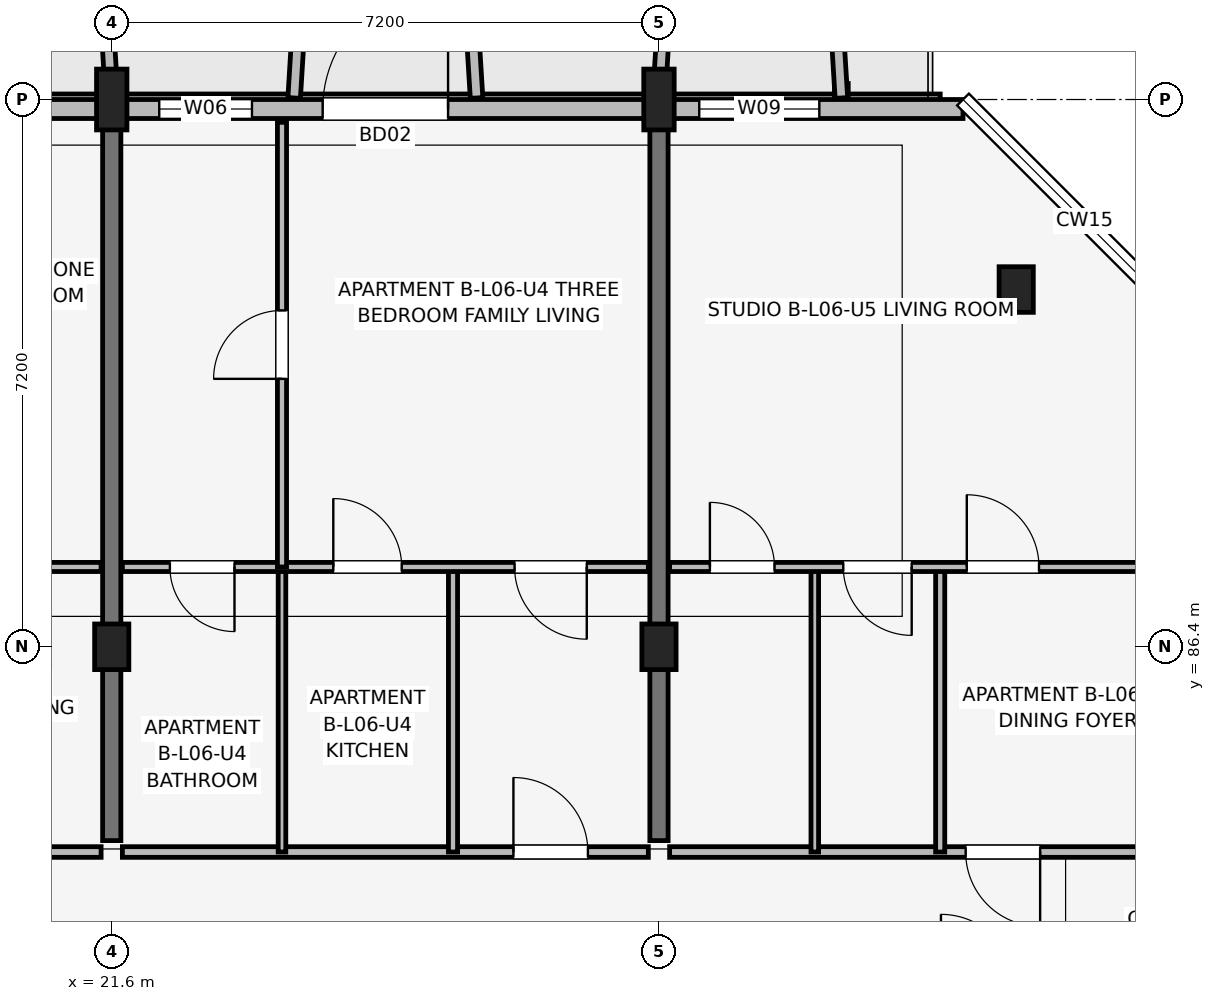
"""IFC4 building model, lengths in metres.
Left out: names, types, materials, properties, quantities, classifications, styles, units other than length and angle.
Written with IfcOpenShell. Run it as: python <this file> out.ifc"""

import sys

from ifc_helpers import new_model, si_unit, direction, frame, frame_2d, origin, origin_2d, place, context, subcontext, project, spatial, rectangle, extrude, element, fill, save


model = new_model("IFC4")
c1 = context("Model", 3, precision=1e-05, world=origin(), true_north=direction((0.0, 1.0)))
c2 = subcontext(c1, "Body", "Model", "MODEL_VIEW")
j1 = project(units=[si_unit("LENGTHUNIT", "METRE"), si_unit("PLANEANGLEUNIT", "RADIAN")], contexts=[c1])
p1 = place(None, origin())
s1 = spatial("IfcSite", under=j1, at=p1, CompositionType="ELEMENT")
p2 = place(p1, origin())
s2 = spatial("IfcBuilding", under=s1, at=p2, CompositionType="ELEMENT")
p3 = place(p2, frame((0.0, 0.0, 21.3)))
s3 = spatial("IfcBuildingStorey", under=s2, at=p3, CompositionType="ELEMENT", Elevation=21.3)
p4 = place(p3, frame((21.6, 86.4, 0.0), z_axis=(0.0, 0.0, 1.0), x_axis=(1.0, 0.0, 0.0)))
e1 = element("IfcColumn", 1, at=p4, inside=s3, PredefinedType="COLUMN", context=c2, shape_type="SweptSolid", body=[
    extrude(rectangle(XDim=0.45, YDim=0.6, at=origin_2d()), origin(), (0.0, 0.0, 1.0), 3.15),
])
p5 = place(p3, frame((21.6, 93.6, 0.0), z_axis=(0.0, 0.0, 1.0), x_axis=(1.0, 0.0, 0.0)))
e2 = element("IfcColumn", 2, at=p5, inside=s3, PredefinedType="COLUMN", context=c2, shape_type="SweptSolid", body=[
    extrude(rectangle(XDim=0.4, YDim=0.8, at=origin_2d()), origin(), (0.0, 0.0, 1.0), 3.15),
])
p6 = place(p3, frame((28.8, 86.4, 0.0), z_axis=(0.0, 0.0, 1.0), x_axis=(1.0, 0.0, 0.0)))
e3 = element("IfcColumn", 3, at=p6, inside=s3, PredefinedType="COLUMN", context=c2, shape_type="SweptSolid", body=[
    extrude(rectangle(XDim=0.45, YDim=0.6, at=origin_2d()), origin(), (0.0, 0.0, 1.0), 3.15),
])
p7 = place(p3, frame((28.8, 93.6, 0.0), z_axis=(0.0, 0.0, 1.0), x_axis=(1.0, 0.0, 0.0)))
e4 = element("IfcColumn", 4, at=p7, inside=s3, PredefinedType="COLUMN", context=c2, shape_type="SweptSolid", body=[
    extrude(rectangle(XDim=0.4, YDim=0.8, at=origin_2d()), origin(), (0.0, 0.0, 1.0), 3.15),
])
p8 = place(p3, frame((33.5, 91.1, 0.0), z_axis=(0.0, 0.0, 1.0), x_axis=(1.0, 0.0, 0.0)))
e5 = element("IfcColumn", 5, at=p8, inside=s3, PredefinedType="COLUMN", context=c2, shape_type="SweptSolid", body=[
    extrude(rectangle(XDim=0.45, YDim=0.6, at=origin_2d()), origin(), (0.0, 0.0, 1.0), 3.15),
])
for number, where, z_axis, x_axis in (
    (6, (21.6, 83.85, 0.0), (0.0, 0.0, 1.0), (0.0, 1.0, 0.0)),
    (7, (28.8, 83.85, 0.0), (0.0, 0.0, 1.0), (0.0, 1.0, 0.0)),
):
    element("IfcWall", number, at=place(p3, frame(where, z_axis=z_axis, x_axis=x_axis)), inside=s3, PredefinedType="SHEAR", context=c2, shape_type="SweptSolid", body=[
        extrude(rectangle(XDim=9.4, YDim=0.24, at=frame_2d((4.7, 0.0))), origin(), (0.0, 0.0, 1.0), 3.15),
    ])
p9 = place(p3, frame((32.8, 93.475, 0.0), z_axis=(0.0, 0.0, 1.0), x_axis=(-1.0, 0.0, 0.0)))
e8 = element("IfcWall", 8, at=p9, inside=s3, PredefinedType="SOLIDWALL", context=c2, shape_type="SweptSolid", body=[
    extrude(rectangle(XDim=29.6, YDim=0.25, at=frame_2d((14.8, 0.0))), origin(), (0.0, 0.0, 1.0), 2.43),
])
p10 = place(p9, frame((22.9, 0.0, 0.0), z_axis=(0.0, 0.0, 1.0), x_axis=(-1.0, 0.0, 0.0)))
e9 = element("IfcOpeningElement", 9, at=p10, cuts=e8, PredefinedType="OPENING", context=c2, shape_type="SweptSolid", body=[
    extrude(rectangle(XDim=1.8, YDim=2.15, at=frame_2d((0.9, 1.075))), frame((0.0, 0.135, 0.0), z_axis=(0.0, -1.0, 0.0), x_axis=(1.0, 0.0, 0.0)), (0.0, 0.0, 1.0), 0.27),
])
p11 = place(p9, frame((8.425, 0.0, 0.0), z_axis=(0.0, 0.0, 1.0), x_axis=(-1.0, 0.0, 0.0)))
e10 = element("IfcOpeningElement", 10, at=p11, cuts=e8, PredefinedType="OPENING", context=c2, shape_type="SweptSolid", body=[
    extrude(rectangle(XDim=1.65, YDim=2.15, at=frame_2d((0.825, 1.075))), frame((0.0, 0.135, 0.0), z_axis=(0.0, -1.0, 0.0), x_axis=(1.0, 0.0, 0.0)), (0.0, 0.0, 1.0), 0.27),
])
p12 = place(p9, frame((26.25, 0.0, 0.75)))
e11 = element("IfcOpeningElement", 11, at=p12, cuts=e8, PredefinedType="OPENING", context=c2, shape_type="SweptSolid", body=[
    extrude(rectangle(XDim=0.72, YDim=1.35, at=frame_2d((0.36, 0.675))), frame((0.0, 0.135, 0.0), z_axis=(0.0, -1.0, 0.0), x_axis=(1.0, 0.0, 0.0)), (0.0, 0.0, 1.0), 0.27),
])
p13 = place(p9, frame((24.065, 0.0, 0.75)))
e12 = element("IfcOpeningElement", 12, at=p13, cuts=e8, PredefinedType="OPENING", context=c2, shape_type="SweptSolid", body=[
    extrude(rectangle(XDim=0.85, YDim=1.4, at=frame_2d((0.425, 0.7))), frame((0.0, 0.135, 0.0), z_axis=(0.0, -1.0, 0.0), x_axis=(1.0, 0.0, 0.0)), (0.0, 0.0, 1.0), 0.27),
])
p14 = place(p9, frame((16.675, 0.0, 0.75)))
e13 = element("IfcOpeningElement", 13, at=p14, cuts=e8, PredefinedType="OPENING", context=c2, shape_type="SweptSolid", body=[
    extrude(rectangle(XDim=0.98, YDim=1.45, at=frame_2d((0.49, 0.725))), frame((0.0, 0.135, 0.0), z_axis=(0.0, -1.0, 0.0), x_axis=(1.0, 0.0, 0.0)), (0.0, 0.0, 1.0), 0.27),
])
p15 = place(p9, frame((13.725, 0.0, 0.67)))
e14 = element("IfcOpeningElement", 14, at=p15, cuts=e8, PredefinedType="OPENING", context=c2, shape_type="SweptSolid", body=[
    extrude(rectangle(XDim=2.15, YDim=1.65, at=frame_2d((1.075, 0.825))), frame((0.0, 0.135, 0.0), z_axis=(0.0, -1.0, 0.0), x_axis=(1.0, 0.0, 0.0)), (0.0, 0.0, 1.0), 0.27),
])
p16 = place(p9, frame((9.355, 0.0, 0.75)))
e15 = element("IfcOpeningElement", 15, at=p16, cuts=e8, PredefinedType="OPENING", context=c2, shape_type="SweptSolid", body=[
    extrude(rectangle(XDim=1.22, YDim=1.5, at=frame_2d((0.61, 0.75))), frame((0.0, 0.135, 0.0), z_axis=(0.0, -1.0, 0.0), x_axis=(1.0, 0.0, 0.0)), (0.0, 0.0, 1.0), 0.27),
])
p17 = place(p9, frame((1.89, 0.0, 0.7)))
e16 = element("IfcOpeningElement", 16, at=p17, cuts=e8, PredefinedType="OPENING", context=c2, shape_type="SweptSolid", body=[
    extrude(rectangle(XDim=1.58, YDim=1.6, at=frame_2d((0.79, 0.8))), frame((0.0, 0.135, 0.0), z_axis=(0.0, -1.0, 0.0), x_axis=(1.0, 0.0, 0.0)), (0.0, 0.0, 1.0), 0.27),
])
p18 = place(p3, frame((21.6, 93.62, 0.0), z_axis=(0.0, 0.0, 1.0), x_axis=(-0.061170732449, 0.998127317276, 0.0)))
e17 = element("IfcWall", 17, at=p18, inside=s3, PredefinedType="ELEMENTEDWALL", context=c2, shape_type="SweptSolid", body=[
    extrude(rectangle(XDim=1.964, YDim=0.165, at=frame_2d((0.982, 0.0))), origin(), (0.0, 0.0, 1.0), 2.53),
])
for number, where, z_axis, x_axis in (
    (18, (24.0, 93.62, 0.0), (0.0, 0.0, 1.0), (0.061, 0.998, 0.0)),
    (19, (26.4, 93.62, 0.0), (0.0, 0.0, 1.0), (-0.061, 0.998, 0.0)),
):
    element("IfcWall", number, at=place(p3, frame(where, z_axis=z_axis, x_axis=x_axis)), inside=s3, PredefinedType="ELEMENTEDWALL", context=c2, shape_type="SweptSolid", body=[
        extrude(rectangle(XDim=1.964, YDim=0.165, at=frame_2d((0.982, 0.0))), origin(), (0.0, 0.0, 1.0), 2.55),
    ])
for number, where, z_axis, x_axis in (
    (20, (28.8, 93.62, 0.0), (0.0, 0.0, 1.0), (0.061, 0.998, 0.0)),
    (21, (31.2, 93.62, 0.0), (0.0, 0.0, 1.0), (-0.061, 0.998, 0.0)),
):
    element("IfcWall", number, at=place(p3, frame(where, z_axis=z_axis, x_axis=x_axis)), inside=s3, PredefinedType="ELEMENTEDWALL", context=c2, shape_type="SweptSolid", body=[
        extrude(rectangle(XDim=1.964, YDim=0.165, at=frame_2d((0.982, 0.0))), origin(), (0.0, 0.0, 1.0), 2.95),
    ])
p19 = place(p3, frame((14.54, 83.7, 0.0), z_axis=(0.0, 0.0, 1.0), x_axis=(1.0, 0.0, 0.0)))
e22 = element("IfcWall", 22, at=p19, inside=s3, PredefinedType="PARTITIONING", context=c2, shape_type="SweptSolid", body=[
    extrude(rectangle(XDim=6.92, YDim=0.14, at=frame_2d((3.46, 0.0))), origin(), (0.0, 0.0, 1.0), 2.38),
])
p20 = place(p19, frame((5.975, 0.0, 0.0), z_axis=(0.0, 0.0, 1.0), x_axis=(-1.0, 0.0, 0.0)))
e23 = element("IfcOpeningElement", 23, at=p20, cuts=e22, PredefinedType="OPENING", context=c2, shape_type="SweptSolid", body=[
    extrude(rectangle(XDim=0.98, YDim=2.1, at=frame_2d((0.49, 1.05))), frame((0.0, 0.08, 0.0), z_axis=(0.0, -1.0, 0.0), x_axis=(1.0, 0.0, 0.0)), (0.0, 0.0, 1.0), 0.16),
])
p21 = place(p3, frame((14.54, 87.45, 0.0), z_axis=(0.0, 0.0, 1.0), x_axis=(1.0, 0.0, 0.0)))
e24 = element("IfcWall", 24, at=p21, inside=s3, PredefinedType="PARTITIONING", context=c2, shape_type="SweptSolid", body=[
    extrude(rectangle(XDim=6.92, YDim=0.12, at=frame_2d((3.46, 0.0))), origin(), (0.0, 0.0, 1.0), 2.38),
])
p22 = place(p21, frame((0.625, 0.0, 0.0)))
e25 = element("IfcOpeningElement", 25, at=p22, cuts=e24, PredefinedType="OPENING", context=c2, shape_type="SweptSolid", body=[
    extrude(rectangle(XDim=0.85, YDim=2.08, at=frame_2d((0.425, 1.04))), frame((0.0, 0.07, 0.0), z_axis=(0.0, -1.0, 0.0), x_axis=(1.0, 0.0, 0.0)), (0.0, 0.0, 1.0), 0.14),
])
p23 = place(p21, frame((3.525, 0.0, 0.0), z_axis=(0.0, 0.0, 1.0), x_axis=(-1.0, 0.0, 0.0)))
e26 = element("IfcOpeningElement", 26, at=p23, cuts=e24, PredefinedType="OPENING", context=c2, shape_type="SweptSolid", body=[
    extrude(rectangle(XDim=0.9, YDim=2.08, at=frame_2d((0.45, 1.04))), frame((0.0, 0.07, 0.0), z_axis=(0.0, -1.0, 0.0), x_axis=(1.0, 0.0, 0.0)), (0.0, 0.0, 1.0), 0.14),
])
p24 = place(p21, frame((5.01, 0.0, 0.0)))
e27 = element("IfcOpeningElement", 27, at=p24, cuts=e24, PredefinedType="OPENING", context=c2, shape_type="SweptSolid", body=[
    extrude(rectangle(XDim=0.95, YDim=2.08, at=frame_2d((0.475, 1.04))), frame((0.0, 0.07, 0.0), z_axis=(0.0, -1.0, 0.0), x_axis=(1.0, 0.0, 0.0)), (0.0, 0.0, 1.0), 0.14),
])
p25 = place(p3, frame((21.74, 83.7, 0.0), z_axis=(0.0, 0.0, 1.0), x_axis=(1.0, 0.0, 0.0)))
e28 = element("IfcWall", 28, at=p25, inside=s3, PredefinedType="PARTITIONING", context=c2, shape_type="SweptSolid", body=[
    extrude(rectangle(XDim=6.92, YDim=0.14, at=frame_2d((3.46, 0.0))), origin(), (0.0, 0.0, 1.0), 2.38),
])
p26 = place(p25, frame((5.145, 0.0, 0.0)))
e29 = element("IfcOpeningElement", 29, at=p26, cuts=e28, PredefinedType="OPENING", context=c2, shape_type="SweptSolid", body=[
    extrude(rectangle(XDim=0.98, YDim=2.1, at=frame_2d((0.49, 1.05))), frame((0.0, 0.08, 0.0), z_axis=(0.0, -1.0, 0.0), x_axis=(1.0, 0.0, 0.0)), (0.0, 0.0, 1.0), 0.16),
])
p27 = place(p3, frame((23.84, 83.7, 0.0), z_axis=(0.0, 0.0, 1.0), x_axis=(0.0, 1.0, 0.0)))
e30 = element("IfcWall", 30, at=p27, inside=s3, PredefinedType="PARTITIONING", context=c2, shape_type="SweptSolid", body=[
    extrude(rectangle(XDim=3.75, YDim=0.1, at=frame_2d((1.875, 0.0))), origin(), (0.0, 0.0, 1.0), 2.38),
])
p28 = place(p3, frame((26.09, 83.7, 0.0), z_axis=(0.0, 0.0, 1.0), x_axis=(0.0, 1.0, 0.0)))
e31 = element("IfcWall", 31, at=p28, inside=s3, PredefinedType="PARTITIONING", context=c2, shape_type="SweptSolid", body=[
    extrude(rectangle(XDim=3.75, YDim=0.12, at=frame_2d((1.875, 0.0))), origin(), (0.0, 0.0, 1.0), 2.38),
])
p29 = place(p3, frame((21.74, 87.45, 0.0), z_axis=(0.0, 0.0, 1.0), x_axis=(1.0, 0.0, 0.0)))
e32 = element("IfcWall", 32, at=p29, inside=s3, PredefinedType="PARTITIONING", context=c2, shape_type="SweptSolid", body=[
    extrude(rectangle(XDim=6.92, YDim=0.12, at=frame_2d((3.46, 0.0))), origin(), (0.0, 0.0, 1.0), 2.38),
])
p30 = place(p29, frame((1.475, 0.0, 0.0), z_axis=(0.0, 0.0, 1.0), x_axis=(-1.0, 0.0, 0.0)))
e33 = element("IfcOpeningElement", 33, at=p30, cuts=e32, PredefinedType="OPENING", context=c2, shape_type="SweptSolid", body=[
    extrude(rectangle(XDim=0.85, YDim=2.08, at=frame_2d((0.425, 1.04))), frame((0.0, 0.07, 0.0), z_axis=(0.0, -1.0, 0.0), x_axis=(1.0, 0.0, 0.0)), (0.0, 0.0, 1.0), 0.14),
])
p31 = place(p29, frame((2.775, 0.0, 0.0)))
e34 = element("IfcOpeningElement", 34, at=p31, cuts=e32, PredefinedType="OPENING", context=c2, shape_type="SweptSolid", body=[
    extrude(rectangle(XDim=0.9, YDim=2.08, at=frame_2d((0.45, 1.04))), frame((0.0, 0.07, 0.0), z_axis=(0.0, -1.0, 0.0), x_axis=(1.0, 0.0, 0.0)), (0.0, 0.0, 1.0), 0.14),
])
p32 = place(p29, frame((6.11, 0.0, 0.0), z_axis=(0.0, 0.0, 1.0), x_axis=(-1.0, 0.0, 0.0)))
e35 = element("IfcOpeningElement", 35, at=p32, cuts=e32, PredefinedType="OPENING", context=c2, shape_type="SweptSolid", body=[
    extrude(rectangle(XDim=0.95, YDim=2.08, at=frame_2d((0.475, 1.04))), frame((0.0, 0.07, 0.0), z_axis=(0.0, -1.0, 0.0), x_axis=(1.0, 0.0, 0.0)), (0.0, 0.0, 1.0), 0.14),
])
p33 = place(p3, frame((23.84, 87.45, 0.0), z_axis=(0.0, 0.0, 1.0), x_axis=(0.0, 1.0, 0.0)))
e36 = element("IfcWall", 36, at=p33, inside=s3, PredefinedType="PARTITIONING", context=c2, shape_type="SweptSolid", body=[
    extrude(rectangle(XDim=5.85, YDim=0.12, at=frame_2d((2.925, 0.0))), origin(), (0.0, 0.0, 1.0), 2.38),
])
p34 = place(p33, frame((2.475, 0.0, 0.0)))
e37 = element("IfcOpeningElement", 37, at=p34, cuts=e36, PredefinedType="OPENING", context=c2, shape_type="SweptSolid", body=[
    extrude(rectangle(XDim=0.9, YDim=2.08, at=frame_2d((0.45, 1.04))), frame((0.0, 0.07, 0.0), z_axis=(0.0, -1.0, 0.0), x_axis=(1.0, 0.0, 0.0)), (0.0, 0.0, 1.0), 0.14),
])
p35 = place(p3, frame((28.94, 83.7, 0.0), z_axis=(0.0, 0.0, 1.0), x_axis=(1.0, 0.0, 0.0)))
e38 = element("IfcWall", 38, at=p35, inside=s3, PredefinedType="PARTITIONING", context=c2, shape_type="SweptSolid", body=[
    extrude(rectangle(XDim=6.92, YDim=0.14, at=frame_2d((3.46, 0.0))), origin(), (0.0, 0.0, 1.0), 2.38),
])
p36 = place(p35, frame((4.875, 0.0, 0.0), z_axis=(0.0, 0.0, 1.0), x_axis=(-1.0, 0.0, 0.0)))
e39 = element("IfcOpeningElement", 39, at=p36, cuts=e38, PredefinedType="OPENING", context=c2, shape_type="SweptSolid", body=[
    extrude(rectangle(XDim=0.98, YDim=2.1, at=frame_2d((0.49, 1.05))), frame((0.0, 0.08, 0.0), z_axis=(0.0, -1.0, 0.0), x_axis=(1.0, 0.0, 0.0)), (0.0, 0.0, 1.0), 0.16),
])
p37 = place(p3, frame((30.85, 83.7, 0.0), z_axis=(0.0, 0.0, 1.0), x_axis=(0.0, 1.0, 0.0)))
e40 = element("IfcWall", 40, at=p37, inside=s3, PredefinedType="PARTITIONING", context=c2, shape_type="SweptSolid", body=[
    extrude(rectangle(XDim=3.75, YDim=0.1, at=frame_2d((1.875, 0.0))), origin(), (0.0, 0.0, 1.0), 2.38),
])
p38 = place(p3, frame((32.5, 83.7, 0.0), z_axis=(0.0, 0.0, 1.0), x_axis=(0.0, 1.0, 0.0)))
e41 = element("IfcWall", 41, at=p38, inside=s3, PredefinedType="PARTITIONING", context=c2, shape_type="SweptSolid", body=[
    extrude(rectangle(XDim=3.75, YDim=0.12, at=frame_2d((1.875, 0.0))), origin(), (0.0, 0.0, 1.0), 2.38),
])
p39 = place(p3, frame((28.94, 87.45, 0.0), z_axis=(0.0, 0.0, 1.0), x_axis=(1.0, 0.0, 0.0)))
e42 = element("IfcWall", 42, at=p39, inside=s3, PredefinedType="PARTITIONING", context=c2, shape_type="SweptSolid", body=[
    extrude(rectangle(XDim=6.92, YDim=0.12, at=frame_2d((3.46, 0.0))), origin(), (0.0, 0.0, 1.0), 2.38),
])
p40 = place(p39, frame((0.53, 0.0, 0.0)))
e43 = element("IfcOpeningElement", 43, at=p40, cuts=e42, PredefinedType="OPENING", context=c2, shape_type="SweptSolid", body=[
    extrude(rectangle(XDim=0.85, YDim=2.08, at=frame_2d((0.425, 1.04))), frame((0.0, 0.07, 0.0), z_axis=(0.0, -1.0, 0.0), x_axis=(1.0, 0.0, 0.0)), (0.0, 0.0, 1.0), 0.14),
])
p41 = place(p39, frame((3.185, 0.0, 0.0), z_axis=(0.0, 0.0, 1.0), x_axis=(-1.0, 0.0, 0.0)))
e44 = element("IfcOpeningElement", 44, at=p41, cuts=e42, PredefinedType="OPENING", context=c2, shape_type="SweptSolid", body=[
    extrude(rectangle(XDim=0.9, YDim=2.08, at=frame_2d((0.45, 1.04))), frame((0.0, 0.07, 0.0), z_axis=(0.0, -1.0, 0.0), x_axis=(1.0, 0.0, 0.0)), (0.0, 0.0, 1.0), 0.14),
])
p42 = place(p39, frame((3.91, 0.0, 0.0)))
e45 = element("IfcOpeningElement", 45, at=p42, cuts=e42, PredefinedType="OPENING", context=c2, shape_type="SweptSolid", body=[
    extrude(rectangle(XDim=0.95, YDim=2.08, at=frame_2d((0.475, 1.04))), frame((0.0, 0.07, 0.0), z_axis=(0.0, -1.0, 0.0), x_axis=(1.0, 0.0, 0.0)), (0.0, 0.0, 1.0), 0.14),
])
p43 = place(p11, origin())
e46 = element("IfcDoor", 46, at=p43, inside=s3, OperationType="SINGLE_SWING_LEFT", PredefinedType="DOOR", context=c2, shape_type="SweptSolid", body=[
    extrude(rectangle(XDim=1.65, YDim=2.15, at=frame_2d((0.825, 1.075))), frame((0.0, 0.025, 0.0), z_axis=(0.0, -1.0, 0.0), x_axis=(1.0, 0.0, 0.0)), (0.0, 0.0, 1.0), 0.05),
])
fill(e10, e46)
p44 = place(p16, origin())
e47 = element("IfcWindow", 47, at=p44, inside=s3, PartitioningType="SINGLE_PANEL", PredefinedType="WINDOW", context=c2, shape_type="SweptSolid", body=[
    extrude(rectangle(XDim=1.22, YDim=1.5, at=frame_2d((0.61, 0.75))), frame((0.0, 0.03, 0.0), z_axis=(0.0, -1.0, 0.0), x_axis=(1.0, 0.0, 0.0)), (0.0, 0.0, 1.0), 0.06),
])
fill(e15, e47)
p45 = place(p17, origin())
e48 = element("IfcWindow", 48, at=p45, inside=s3, PartitioningType="SINGLE_PANEL", PredefinedType="WINDOW", context=c2, shape_type="SweptSolid", body=[
    extrude(rectangle(XDim=1.58, YDim=1.6, at=frame_2d((0.79, 0.8))), frame((0.0, 0.03, 0.0), z_axis=(0.0, -1.0, 0.0), x_axis=(1.0, 0.0, 0.0)), (0.0, 0.0, 1.0), 0.06),
])
fill(e16, e48)
p46 = place(p26, origin())
e49 = element("IfcDoor", 49, at=p46, inside=s3, OperationType="SINGLE_SWING_LEFT", PredefinedType="DOOR", context=c2, shape_type="SweptSolid", body=[
    extrude(rectangle(XDim=0.98, YDim=2.1, at=frame_2d((0.49, 1.05))), frame((0.0, 0.025, 0.0), z_axis=(0.0, -1.0, 0.0), x_axis=(1.0, 0.0, 0.0)), (0.0, 0.0, 1.0), 0.05),
])
fill(e29, e49)
p47 = place(p30, origin())
e50 = element("IfcDoor", 50, at=p47, inside=s3, OperationType="SINGLE_SWING_RIGHT", PredefinedType="DOOR", context=c2, shape_type="SweptSolid", body=[
    extrude(rectangle(XDim=0.85, YDim=2.08, at=frame_2d((0.425, 1.04))), frame((0.0, 0.025, 0.0), z_axis=(0.0, -1.0, 0.0), x_axis=(1.0, 0.0, 0.0)), (0.0, 0.0, 1.0), 0.05),
])
fill(e33, e50)
p48 = place(p31, origin())
e51 = element("IfcDoor", 51, at=p48, inside=s3, OperationType="SINGLE_SWING_LEFT", PredefinedType="DOOR", context=c2, shape_type="SweptSolid", body=[
    extrude(rectangle(XDim=0.9, YDim=2.08, at=frame_2d((0.45, 1.04))), frame((0.0, 0.025, 0.0), z_axis=(0.0, -1.0, 0.0), x_axis=(1.0, 0.0, 0.0)), (0.0, 0.0, 1.0), 0.05),
])
fill(e34, e51)
p49 = place(p32, origin())
e52 = element("IfcDoor", 52, at=p49, inside=s3, OperationType="SINGLE_SWING_RIGHT", PredefinedType="DOOR", context=c2, shape_type="SweptSolid", body=[
    extrude(rectangle(XDim=0.95, YDim=2.08, at=frame_2d((0.475, 1.04))), frame((0.0, 0.025, 0.0), z_axis=(0.0, -1.0, 0.0), x_axis=(1.0, 0.0, 0.0)), (0.0, 0.0, 1.0), 0.05),
])
fill(e35, e52)
p50 = place(p34, origin())
e53 = element("IfcDoor", 53, at=p50, inside=s3, OperationType="SINGLE_SWING_LEFT", PredefinedType="DOOR", context=c2, shape_type="SweptSolid", body=[
    extrude(rectangle(XDim=0.9, YDim=2.08, at=frame_2d((0.45, 1.04))), frame((0.0, 0.025, 0.0), z_axis=(0.0, -1.0, 0.0), x_axis=(1.0, 0.0, 0.0)), (0.0, 0.0, 1.0), 0.05),
])
fill(e37, e53)
p51 = place(p36, origin())
e54 = element("IfcDoor", 54, at=p51, inside=s3, OperationType="SINGLE_SWING_RIGHT", PredefinedType="DOOR", context=c2, shape_type="SweptSolid", body=[
    extrude(rectangle(XDim=0.98, YDim=2.1, at=frame_2d((0.49, 1.05))), frame((0.0, 0.025, 0.0), z_axis=(0.0, -1.0, 0.0), x_axis=(1.0, 0.0, 0.0)), (0.0, 0.0, 1.0), 0.05),
])
fill(e39, e54)
p52 = place(p40, origin())
e55 = element("IfcDoor", 55, at=p52, inside=s3, OperationType="SINGLE_SWING_LEFT", PredefinedType="DOOR", context=c2, shape_type="SweptSolid", body=[
    extrude(rectangle(XDim=0.85, YDim=2.08, at=frame_2d((0.425, 1.04))), frame((0.0, 0.025, 0.0), z_axis=(0.0, -1.0, 0.0), x_axis=(1.0, 0.0, 0.0)), (0.0, 0.0, 1.0), 0.05),
])
fill(e43, e55)
p53 = place(p41, origin())
e56 = element("IfcDoor", 56, at=p53, inside=s3, OperationType="SINGLE_SWING_RIGHT", PredefinedType="DOOR", context=c2, shape_type="SweptSolid", body=[
    extrude(rectangle(XDim=0.9, YDim=2.08, at=frame_2d((0.45, 1.04))), frame((0.0, 0.025, 0.0), z_axis=(0.0, -1.0, 0.0), x_axis=(1.0, 0.0, 0.0)), (0.0, 0.0, 1.0), 0.05),
])
fill(e44, e56)
p54 = place(p42, origin())
e57 = element("IfcDoor", 57, at=p54, inside=s3, OperationType="SINGLE_SWING_LEFT", PredefinedType="DOOR", context=c2, shape_type="SweptSolid", body=[
    extrude(rectangle(XDim=0.95, YDim=2.08, at=frame_2d((0.475, 1.04))), frame((0.0, 0.025, 0.0), z_axis=(0.0, -1.0, 0.0), x_axis=(1.0, 0.0, 0.0)), (0.0, 0.0, 1.0), 0.05),
])
fill(e45, e57)
save(model, sys.argv[1])
